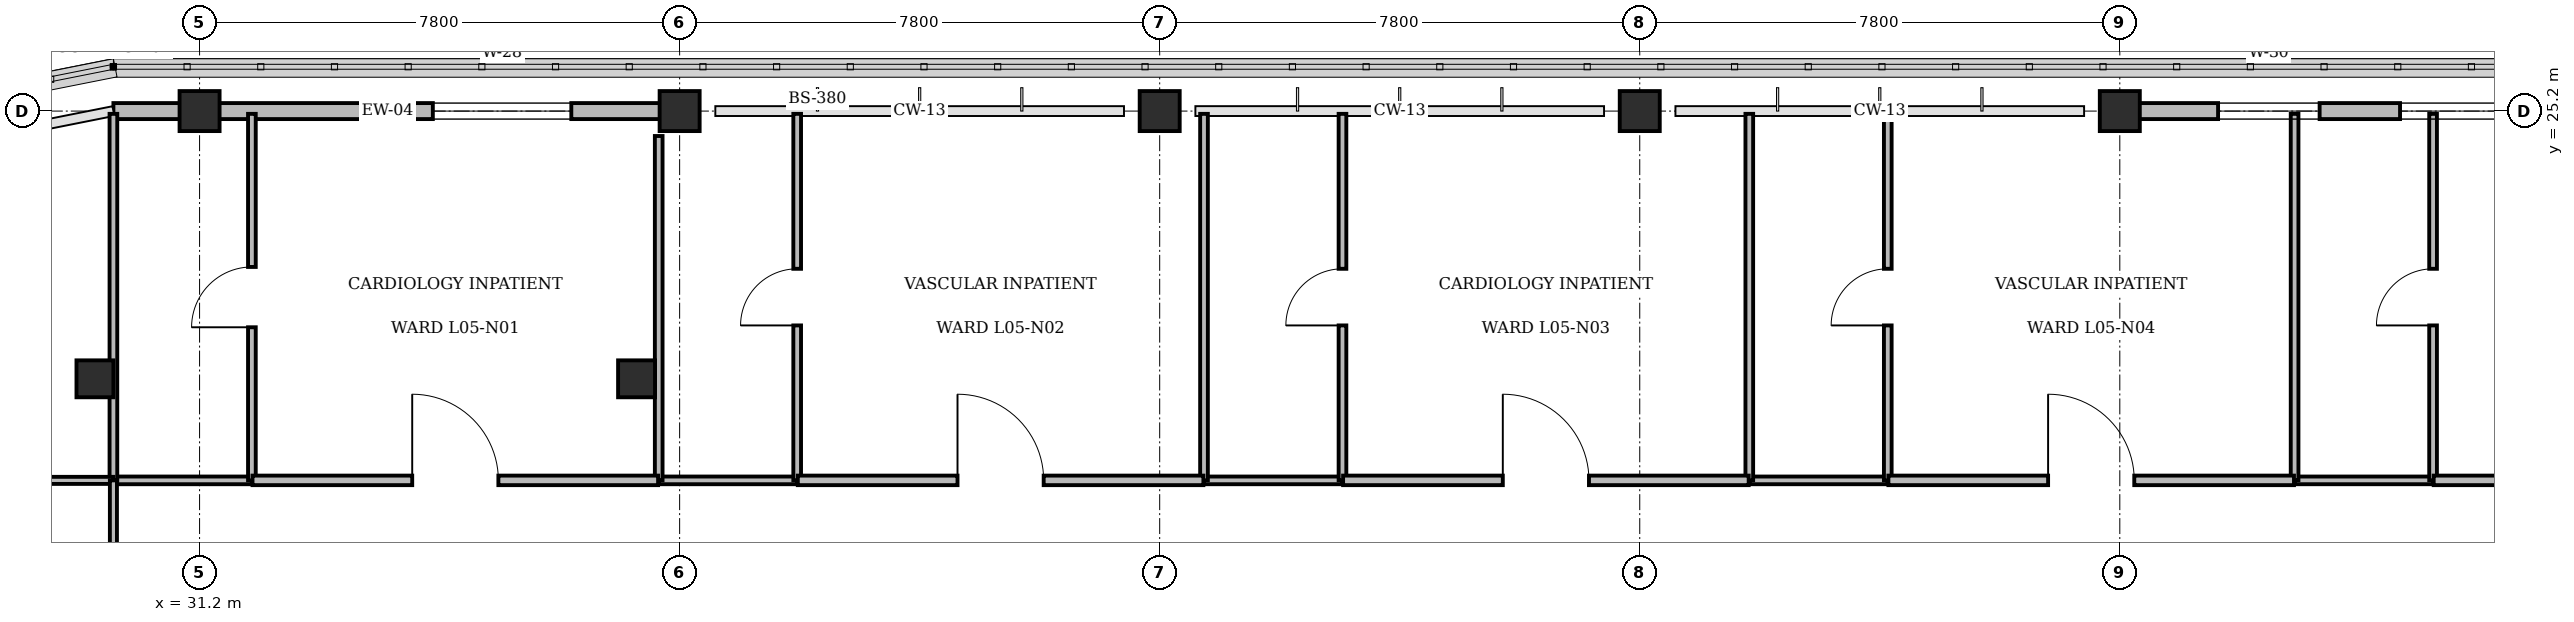
"""IFC4 building model, lengths in metres.
Left out: names, types, materials, properties, quantities, classifications, styles, units other than length and angle.
Written with IfcOpenShell. Run it as: python <this file> out.ifc"""

import sys

from ifc_helpers import new_model, si_unit, direction, frame, frame_2d, origin, origin_2d, place, context, subcontext, project, spatial, rectangle, circle, extrude, element, fill, save


model = new_model("IFC4")
c1 = context("Model", 3, precision=1e-05, world=origin(), true_north=direction((0.0, 1.0)))
c2 = subcontext(c1, "Body", "Model", "MODEL_VIEW")
j1 = project(units=[si_unit("LENGTHUNIT", "METRE"), si_unit("PLANEANGLEUNIT", "RADIAN")], contexts=[c1])
p1 = place(None, origin())
s1 = spatial("IfcSite", under=j1, at=p1, CompositionType="ELEMENT")
p2 = place(p1, origin())
s2 = spatial("IfcBuilding", under=s1, at=p2, CompositionType="ELEMENT")
p3 = place(p2, frame((0.0, 0.0, 22.2)))
s3 = spatial("IfcBuildingStorey", under=s2, at=p3, CompositionType="ELEMENT", Elevation=22.2)
for number, where, z_axis, x_axis in (
    (1, (31.2, 25.2, 0.0), (0.0, 0.0, 1.0), (1.0, 0.0, 0.0)),
    (2, (39.0, 25.2, 0.0), (0.0, 0.0, 1.0), (1.0, 0.0, 0.0)),
    (3, (46.8, 25.2, 0.0), (0.0, 0.0, 1.0), (1.0, 0.0, 0.0)),
    (4, (54.6, 25.2, 0.0), (0.0, 0.0, 1.0), (1.0, 0.0, 0.0)),
    (5, (62.4, 25.2, 0.0), (0.0, 0.0, 1.0), (1.0, 0.0, 0.0)),
):
    element("IfcColumn", number, at=place(p3, frame(where, z_axis=z_axis, x_axis=x_axis)), inside=s3, PredefinedType="COLUMN", context=c2, shape_type="SweptSolid", body=[
        extrude(rectangle(XDim=0.65, YDim=0.65, at=origin_2d()), origin(), (0.0, 0.0, 1.0), 4.2),
    ])
for number, where, z_axis, x_axis in (
    (6, (29.5, 20.85, 0.0), (0.0, 0.0, 1.0), (1.0, 0.0, 0.0)),
    (7, (38.3, 20.85, 0.0), (0.0, 0.0, 1.0), (1.0, 0.0, 0.0)),
):
    element("IfcColumn", number, at=place(p3, frame(where, z_axis=z_axis, x_axis=x_axis)), inside=s3, PredefinedType="PILASTER", context=c2, shape_type="SweptSolid", body=[
        extrude(circle(Radius=0.3, at=origin_2d()), origin(), (0.0, 0.0, 1.0), 4.2),
    ])
p4 = place(p3, frame((29.8, 25.2, 0.0), z_axis=(0.0, 0.0, 1.0), x_axis=(1.0, 0.0, 0.0)))
e8 = element("IfcWall", 8, at=p4, inside=s3, PredefinedType="STANDARD", context=c2, shape_type="SweptSolid", body=[
    extrude(rectangle(XDim=8.91, YDim=0.26, at=frame_2d((4.455, 0.0))), origin(), (0.0, 0.0, 1.0), 3.305),
])
p5 = place(p4, frame((5.19, 0.0, 0.85)))
e9 = element("IfcOpeningElement", 9, at=p5, cuts=e8, PredefinedType="OPENING", context=c2, shape_type="SweptSolid", body=[
    extrude(rectangle(XDim=2.25, YDim=1.45, at=frame_2d((1.125, 0.725))), frame((0.0, 0.14, 0.0), z_axis=(0.0, -1.0, 0.0), x_axis=(1.0, 0.0, 0.0)), (0.0, 0.0, 1.0), 0.28),
])
p6 = place(p3, frame((62.69, 25.2, 0.0), z_axis=(0.0, 0.0, 1.0), x_axis=(1.0, 0.0, 0.0)))
e10 = element("IfcWall", 10, at=p6, inside=s3, PredefinedType="STANDARD", context=c2, shape_type="SweptSolid", body=[
    extrude(rectangle(XDim=7.22, YDim=0.26, at=frame_2d((3.61, 0.0))), origin(), (0.0, 0.0, 1.0), 3.305),
])
p7 = place(p6, frame((1.307, 0.0, 0.85)))
e11 = element("IfcOpeningElement", 11, at=p7, cuts=e10, PredefinedType="OPENING", context=c2, shape_type="SweptSolid", body=[
    extrude(rectangle(XDim=1.65, YDim=1.45, at=frame_2d((0.825, 0.725))), frame((0.0, 0.14, 0.0), z_axis=(0.0, -1.0, 0.0), x_axis=(1.0, 0.0, 0.0)), (0.0, 0.0, 1.0), 0.28),
])
p8 = place(p6, frame((4.263, 0.0, 0.85)))
e12 = element("IfcOpeningElement", 12, at=p8, cuts=e10, PredefinedType="OPENING", context=c2, shape_type="SweptSolid", body=[
    extrude(rectangle(XDim=1.65, YDim=1.45, at=frame_2d((0.825, 0.725))), frame((0.0, 0.14, 0.0), z_axis=(0.0, -1.0, 0.0), x_axis=(1.0, 0.0, 0.0)), (0.0, 0.0, 1.0), 0.28),
])
p9 = place(p3, frame((29.8, 19.2, 0.0), z_axis=(0.0, 0.0, 1.0), x_axis=(1.0, 0.0, 0.0)))
e13 = element("IfcWall", 13, at=p9, inside=s3, PredefinedType="PARTITIONING", context=c2, shape_type="SweptSolid", body=[
    extrude(rectangle(XDim=2.25, YDim=0.125, at=frame_2d((1.125, 0.0))), origin(), (0.0, 0.0, 1.0), 3.9),
])
p10 = place(p3, frame((29.8, 19.2, 0.0), z_axis=(0.0, 0.0, 1.0), x_axis=(0.0, 1.0, 0.0)))
e14 = element("IfcWall", 14, at=p10, inside=s3, PredefinedType="PARTITIONING", context=c2, shape_type="SweptSolid", body=[
    extrude(rectangle(XDim=5.955, YDim=0.125, at=frame_2d((2.978, 0.0))), origin(), (0.0, 0.0, 1.0), 3.9),
])
p11 = place(p3, frame((32.05, 19.2, 0.0), z_axis=(0.0, 0.0, 1.0), x_axis=(0.0, 1.0, 0.0)))
e15 = element("IfcWall", 15, at=p11, inside=s3, PredefinedType="PARTITIONING", context=c2, shape_type="SweptSolid", body=[
    extrude(rectangle(XDim=5.955, YDim=0.125, at=frame_2d((2.978, 0.0))), origin(), (0.0, 0.0, 1.0), 3.9),
])
p12 = place(p11, frame((2.488, 0.0, 0.0)))
e16 = element("IfcOpeningElement", 16, at=p12, cuts=e15, PredefinedType="OPENING", context=c2, shape_type="SweptSolid", body=[
    extrude(rectangle(XDim=0.98, YDim=2.1, at=frame_2d((0.49, 1.05))), frame((0.0, 0.073, 0.0), z_axis=(0.0, -1.0, 0.0), x_axis=(1.0, 0.0, 0.0)), (0.0, 0.0, 1.0), 0.145),
])
p13 = place(p3, frame((38.66, 19.2, 0.0), z_axis=(0.0, 0.0, 1.0), x_axis=(1.0, 0.0, 0.0)))
e17 = element("IfcWall", 17, at=p13, inside=s3, PredefinedType="PARTITIONING", context=c2, shape_type="SweptSolid", body=[
    extrude(rectangle(XDim=2.25, YDim=0.125, at=frame_2d((1.125, 0.0))), origin(), (0.0, 0.0, 1.0), 3.9),
])
p14 = place(p3, frame((38.66, 19.2, 0.0), z_axis=(0.0, 0.0, 1.0), x_axis=(0.0, 1.0, 0.0)))
e18 = element("IfcWall", 18, at=p14, inside=s3, PredefinedType="PARTITIONING", context=c2, shape_type="SweptSolid", body=[
    extrude(rectangle(XDim=5.595, YDim=0.125, at=frame_2d((2.797, 0.0))), origin(), (0.0, 0.0, 1.0), 3.27),
])
p15 = place(p3, frame((40.91, 19.2, 0.0), z_axis=(0.0, 0.0, 1.0), x_axis=(0.0, 1.0, 0.0)))
e19 = element("IfcWall", 19, at=p15, inside=s3, PredefinedType="PARTITIONING", context=c2, shape_type="SweptSolid", body=[
    extrude(rectangle(XDim=5.955, YDim=0.125, at=frame_2d((2.978, 0.0))), origin(), (0.0, 0.0, 1.0), 3.9),
])
p16 = place(p15, frame((2.518, 0.0, 0.0)))
e20 = element("IfcOpeningElement", 20, at=p16, cuts=e19, PredefinedType="OPENING", context=c2, shape_type="SweptSolid", body=[
    extrude(rectangle(XDim=0.92, YDim=2.1, at=frame_2d((0.46, 1.05))), frame((0.0, 0.073, 0.0), z_axis=(0.0, -1.0, 0.0), x_axis=(1.0, 0.0, 0.0)), (0.0, 0.0, 1.0), 0.145),
])
p17 = place(p3, frame((47.52, 19.2, 0.0), z_axis=(0.0, 0.0, 1.0), x_axis=(1.0, 0.0, 0.0)))
e21 = element("IfcWall", 21, at=p17, inside=s3, PredefinedType="PARTITIONING", context=c2, shape_type="SweptSolid", body=[
    extrude(rectangle(XDim=2.25, YDim=0.125, at=frame_2d((1.125, 0.0))), origin(), (0.0, 0.0, 1.0), 3.9),
])
p18 = place(p3, frame((47.52, 19.2, 0.0), z_axis=(0.0, 0.0, 1.0), x_axis=(0.0, 1.0, 0.0)))
e22 = element("IfcWall", 22, at=p18, inside=s3, PredefinedType="PARTITIONING", context=c2, shape_type="SweptSolid", body=[
    extrude(rectangle(XDim=5.955, YDim=0.125, at=frame_2d((2.978, 0.0))), origin(), (0.0, 0.0, 1.0), 3.9),
])
p19 = place(p3, frame((49.77, 19.2, 0.0), z_axis=(0.0, 0.0, 1.0), x_axis=(0.0, 1.0, 0.0)))
e23 = element("IfcWall", 23, at=p19, inside=s3, PredefinedType="PARTITIONING", context=c2, shape_type="SweptSolid", body=[
    extrude(rectangle(XDim=5.955, YDim=0.125, at=frame_2d((2.978, 0.0))), origin(), (0.0, 0.0, 1.0), 3.9),
])
p20 = place(p19, frame((2.518, 0.0, 0.0)))
e24 = element("IfcOpeningElement", 24, at=p20, cuts=e23, PredefinedType="OPENING", context=c2, shape_type="SweptSolid", body=[
    extrude(rectangle(XDim=0.92, YDim=2.1, at=frame_2d((0.46, 1.05))), frame((0.0, 0.073, 0.0), z_axis=(0.0, -1.0, 0.0), x_axis=(1.0, 0.0, 0.0)), (0.0, 0.0, 1.0), 0.145),
])
p21 = place(p3, frame((56.38, 19.2, 0.0), z_axis=(0.0, 0.0, 1.0), x_axis=(1.0, 0.0, 0.0)))
e25 = element("IfcWall", 25, at=p21, inside=s3, PredefinedType="PARTITIONING", context=c2, shape_type="SweptSolid", body=[
    extrude(rectangle(XDim=2.25, YDim=0.125, at=frame_2d((1.125, 0.0))), origin(), (0.0, 0.0, 1.0), 3.9),
])
p22 = place(p3, frame((56.38, 19.2, 0.0), z_axis=(0.0, 0.0, 1.0), x_axis=(0.0, 1.0, 0.0)))
e26 = element("IfcWall", 26, at=p22, inside=s3, PredefinedType="PARTITIONING", context=c2, shape_type="SweptSolid", body=[
    extrude(rectangle(XDim=5.955, YDim=0.125, at=frame_2d((2.978, 0.0))), origin(), (0.0, 0.0, 1.0), 3.9),
])
p23 = place(p3, frame((58.63, 19.2, 0.0), z_axis=(0.0, 0.0, 1.0), x_axis=(0.0, 1.0, 0.0)))
e27 = element("IfcWall", 27, at=p23, inside=s3, PredefinedType="PARTITIONING", context=c2, shape_type="SweptSolid", body=[
    extrude(rectangle(XDim=5.955, YDim=0.125, at=frame_2d((2.978, 0.0))), origin(), (0.0, 0.0, 1.0), 3.9),
])
p24 = place(p23, frame((2.518, 0.0, 0.0)))
e28 = element("IfcOpeningElement", 28, at=p24, cuts=e27, PredefinedType="OPENING", context=c2, shape_type="SweptSolid", body=[
    extrude(rectangle(XDim=0.92, YDim=2.1, at=frame_2d((0.46, 1.05))), frame((0.0, 0.073, 0.0), z_axis=(0.0, -1.0, 0.0), x_axis=(1.0, 0.0, 0.0)), (0.0, 0.0, 1.0), 0.145),
])
p25 = place(p3, frame((65.24, 19.2, 0.0), z_axis=(0.0, 0.0, 1.0), x_axis=(1.0, 0.0, 0.0)))
e29 = element("IfcWall", 29, at=p25, inside=s3, PredefinedType="PARTITIONING", context=c2, shape_type="SweptSolid", body=[
    extrude(rectangle(XDim=2.25, YDim=0.125, at=frame_2d((1.125, 0.0))), origin(), (0.0, 0.0, 1.0), 3.9),
])
p26 = place(p3, frame((65.24, 19.2, 0.0), z_axis=(0.0, 0.0, 1.0), x_axis=(0.0, 1.0, 0.0)))
e30 = element("IfcWall", 30, at=p26, inside=s3, PredefinedType="PARTITIONING", context=c2, shape_type="SweptSolid", body=[
    extrude(rectangle(XDim=5.955, YDim=0.125, at=frame_2d((2.978, 0.0))), origin(), (0.0, 0.0, 1.0), 3.9),
])
p27 = place(p3, frame((67.49, 19.2, 0.0), z_axis=(0.0, 0.0, 1.0), x_axis=(0.0, 1.0, 0.0)))
e31 = element("IfcWall", 31, at=p27, inside=s3, PredefinedType="PARTITIONING", context=c2, shape_type="SweptSolid", body=[
    extrude(rectangle(XDim=5.955, YDim=0.125, at=frame_2d((2.978, 0.0))), origin(), (0.0, 0.0, 1.0), 3.9),
])
p28 = place(p27, frame((2.518, 0.0, 0.0)))
e32 = element("IfcOpeningElement", 32, at=p28, cuts=e31, PredefinedType="OPENING", context=c2, shape_type="SweptSolid", body=[
    extrude(rectangle(XDim=0.92, YDim=2.1, at=frame_2d((0.46, 1.05))), frame((0.0, 0.073, 0.0), z_axis=(0.0, -1.0, 0.0), x_axis=(1.0, 0.0, 0.0)), (0.0, 0.0, 1.0), 0.145),
])
p29 = place(p3, frame((17.7, 19.2, 0.0), z_axis=(0.0, 0.0, 1.0), x_axis=(1.0, 0.0, 0.0)))
e33 = element("IfcWall", 33, at=p29, inside=s3, PredefinedType="PARTITIONING", context=c2, shape_type="SweptSolid", body=[
    extrude(rectangle(XDim=12.1, YDim=0.115, at=frame_2d((6.05, 0.0))), origin(), (0.0, 0.0, 1.0), 3.9),
])
p30 = place(p3, frame((29.8, 6.0, 0.0), z_axis=(0.0, 0.0, 1.0), x_axis=(0.0, 1.0, 0.0)))
e34 = element("IfcWall", 34, at=p30, inside=s3, PredefinedType="PARTITIONING", context=c2, shape_type="SweptSolid", body=[
    extrude(rectangle(XDim=13.2, YDim=0.115, at=frame_2d((6.6, 0.0))), origin(), (0.0, 0.0, 1.0), 3.9),
])
p31 = place(p30, frame((0.25, 0.0, 0.0)))
e35 = element("IfcOpeningElement", 35, at=p31, cuts=e34, PredefinedType="OPENING", context=c2, shape_type="SweptSolid", body=[
    extrude(rectangle(XDim=1.32, YDim=2.15, at=frame_2d((0.66, 1.075))), frame((0.0, 0.067, 0.0), z_axis=(0.0, -1.0, 0.0), x_axis=(1.0, 0.0, 0.0)), (0.0, 0.0, 1.0), 0.135),
])
p32 = place(p3, frame((32.06, 19.2, 0.0), z_axis=(0.0, 0.0, 1.0), x_axis=(1.0, 0.0, 0.0)))
e36 = element("IfcWall", 36, at=p32, inside=s3, PredefinedType="PARTITIONING", context=c2, shape_type="SweptSolid", body=[
    extrude(rectangle(XDim=6.59, YDim=0.155, at=frame_2d((3.295, 0.0))), origin(), (0.0, 0.0, 1.0), 3.9),
])
p33 = place(p32, frame((2.595, 0.0, 0.0)))
e37 = element("IfcOpeningElement", 37, at=p33, cuts=e36, PredefinedType="OPENING", context=c2, shape_type="SweptSolid", body=[
    extrude(rectangle(XDim=1.4, YDim=2.2, at=frame_2d((0.7, 1.1))), frame((0.0, 0.087, 0.0), z_axis=(0.0, -1.0, 0.0), x_axis=(1.0, 0.0, 0.0)), (0.0, 0.0, 1.0), 0.175),
])
p34 = place(p3, frame((40.92, 19.2, 0.0), z_axis=(0.0, 0.0, 1.0), x_axis=(1.0, 0.0, 0.0)))
e38 = element("IfcWall", 38, at=p34, inside=s3, PredefinedType="PARTITIONING", context=c2, shape_type="SweptSolid", body=[
    extrude(rectangle(XDim=6.59, YDim=0.155, at=frame_2d((3.295, 0.0))), origin(), (0.0, 0.0, 1.0), 3.9),
])
p35 = place(p34, frame((2.595, 0.0, 0.0)))
e39 = element("IfcOpeningElement", 39, at=p35, cuts=e38, PredefinedType="OPENING", context=c2, shape_type="SweptSolid", body=[
    extrude(rectangle(XDim=1.4, YDim=2.2, at=frame_2d((0.7, 1.1))), frame((0.0, 0.087, 0.0), z_axis=(0.0, -1.0, 0.0), x_axis=(1.0, 0.0, 0.0)), (0.0, 0.0, 1.0), 0.175),
])
p36 = place(p3, frame((49.78, 19.2, 0.0), z_axis=(0.0, 0.0, 1.0), x_axis=(1.0, 0.0, 0.0)))
e40 = element("IfcWall", 40, at=p36, inside=s3, PredefinedType="PARTITIONING", context=c2, shape_type="SweptSolid", body=[
    extrude(rectangle(XDim=6.59, YDim=0.155, at=frame_2d((3.295, 0.0))), origin(), (0.0, 0.0, 1.0), 3.9),
])
p37 = place(p36, frame((2.595, 0.0, 0.0)))
e41 = element("IfcOpeningElement", 41, at=p37, cuts=e40, PredefinedType="OPENING", context=c2, shape_type="SweptSolid", body=[
    extrude(rectangle(XDim=1.4, YDim=2.2, at=frame_2d((0.7, 1.1))), frame((0.0, 0.087, 0.0), z_axis=(0.0, -1.0, 0.0), x_axis=(1.0, 0.0, 0.0)), (0.0, 0.0, 1.0), 0.175),
])
p38 = place(p3, frame((58.64, 19.2, 0.0), z_axis=(0.0, 0.0, 1.0), x_axis=(1.0, 0.0, 0.0)))
e42 = element("IfcWall", 42, at=p38, inside=s3, PredefinedType="PARTITIONING", context=c2, shape_type="SweptSolid", body=[
    extrude(rectangle(XDim=6.59, YDim=0.155, at=frame_2d((3.295, 0.0))), origin(), (0.0, 0.0, 1.0), 3.9),
])
p39 = place(p38, frame((2.595, 0.0, 0.0)))
e43 = element("IfcOpeningElement", 43, at=p39, cuts=e42, PredefinedType="OPENING", context=c2, shape_type="SweptSolid", body=[
    extrude(rectangle(XDim=1.4, YDim=2.2, at=frame_2d((0.7, 1.1))), frame((0.0, 0.087, 0.0), z_axis=(0.0, -1.0, 0.0), x_axis=(1.0, 0.0, 0.0)), (0.0, 0.0, 1.0), 0.175),
])
p40 = place(p3, frame((67.5, 19.2, 0.0), z_axis=(0.0, 0.0, 1.0), x_axis=(1.0, 0.0, 0.0)))
e44 = element("IfcWall", 44, at=p40, inside=s3, PredefinedType="PARTITIONING", context=c2, shape_type="SweptSolid", body=[
    extrude(rectangle(XDim=6.59, YDim=0.155, at=frame_2d((3.295, 0.0))), origin(), (0.0, 0.0, 1.0), 3.9),
])
p41 = place(p40, frame((2.595, 0.0, 0.0)))
e45 = element("IfcOpeningElement", 45, at=p41, cuts=e44, PredefinedType="OPENING", context=c2, shape_type="SweptSolid", body=[
    extrude(rectangle(XDim=1.4, YDim=2.2, at=frame_2d((0.7, 1.1))), frame((0.0, 0.087, 0.0), z_axis=(0.0, -1.0, 0.0), x_axis=(1.0, 0.0, 0.0)), (0.0, 0.0, 1.0), 0.175),
])
p42 = place(p5, origin())
e46 = element("IfcWindow", 46, at=p42, inside=s3, PartitioningType="SINGLE_PANEL", PredefinedType="WINDOW", context=c2, shape_type="SweptSolid", body=[
    extrude(rectangle(XDim=2.25, YDim=1.45, at=frame_2d((1.125, 0.725))), frame((0.0, 0.03, 0.0), z_axis=(0.0, -1.0, 0.0), x_axis=(1.0, 0.0, 0.0)), (0.0, 0.0, 1.0), 0.06),
])
fill(e9, e46)
p43 = place(p7, origin())
e47 = element("IfcWindow", 47, at=p43, inside=s3, PartitioningType="SINGLE_PANEL", PredefinedType="WINDOW", context=c2, shape_type="SweptSolid", body=[
    extrude(rectangle(XDim=1.65, YDim=1.45, at=frame_2d((0.825, 0.725))), frame((0.0, 0.03, 0.0), z_axis=(0.0, -1.0, 0.0), x_axis=(1.0, 0.0, 0.0)), (0.0, 0.0, 1.0), 0.06),
])
fill(e11, e47)
p44 = place(p8, origin())
e48 = element("IfcWindow", 48, at=p44, inside=s3, PartitioningType="SINGLE_PANEL", PredefinedType="WINDOW", context=c2, shape_type="SweptSolid", body=[
    extrude(rectangle(XDim=1.65, YDim=1.45, at=frame_2d((0.825, 0.725))), frame((0.0, 0.03, 0.0), z_axis=(0.0, -1.0, 0.0), x_axis=(1.0, 0.0, 0.0)), (0.0, 0.0, 1.0), 0.06),
])
fill(e12, e48)
p45 = place(p12, origin())
e49 = element("IfcDoor", 49, at=p45, inside=s3, OperationType="SINGLE_SWING_LEFT", PredefinedType="DOOR", context=c2, shape_type="SweptSolid", body=[
    extrude(rectangle(XDim=0.98, YDim=2.1, at=frame_2d((0.49, 1.05))), frame((0.0, 0.025, 0.0), z_axis=(0.0, -1.0, 0.0), x_axis=(1.0, 0.0, 0.0)), (0.0, 0.0, 1.0), 0.05),
])
fill(e16, e49)
p46 = place(p16, origin())
e50 = element("IfcDoor", 50, at=p46, inside=s3, OperationType="SINGLE_SWING_LEFT", PredefinedType="DOOR", context=c2, shape_type="SweptSolid", body=[
    extrude(rectangle(XDim=0.92, YDim=2.1, at=frame_2d((0.46, 1.05))), frame((0.0, 0.025, 0.0), z_axis=(0.0, -1.0, 0.0), x_axis=(1.0, 0.0, 0.0)), (0.0, 0.0, 1.0), 0.05),
])
fill(e20, e50)
p47 = place(p20, origin())
e51 = element("IfcDoor", 51, at=p47, inside=s3, OperationType="SINGLE_SWING_LEFT", PredefinedType="DOOR", context=c2, shape_type="SweptSolid", body=[
    extrude(rectangle(XDim=0.92, YDim=2.1, at=frame_2d((0.46, 1.05))), frame((0.0, 0.025, 0.0), z_axis=(0.0, -1.0, 0.0), x_axis=(1.0, 0.0, 0.0)), (0.0, 0.0, 1.0), 0.05),
])
fill(e24, e51)
p48 = place(p24, origin())
e52 = element("IfcDoor", 52, at=p48, inside=s3, OperationType="SINGLE_SWING_LEFT", PredefinedType="DOOR", context=c2, shape_type="SweptSolid", body=[
    extrude(rectangle(XDim=0.92, YDim=2.1, at=frame_2d((0.46, 1.05))), frame((0.0, 0.025, 0.0), z_axis=(0.0, -1.0, 0.0), x_axis=(1.0, 0.0, 0.0)), (0.0, 0.0, 1.0), 0.05),
])
fill(e28, e52)
p49 = place(p28, origin())
e53 = element("IfcDoor", 53, at=p49, inside=s3, OperationType="SINGLE_SWING_LEFT", PredefinedType="DOOR", context=c2, shape_type="SweptSolid", body=[
    extrude(rectangle(XDim=0.92, YDim=2.1, at=frame_2d((0.46, 1.05))), frame((0.0, 0.025, 0.0), z_axis=(0.0, -1.0, 0.0), x_axis=(1.0, 0.0, 0.0)), (0.0, 0.0, 1.0), 0.05),
])
fill(e32, e53)
p50 = place(p33, origin())
e54 = element("IfcDoor", 54, at=p50, inside=s3, OperationType="SINGLE_SWING_LEFT", PredefinedType="DOOR", context=c2, shape_type="SweptSolid", body=[
    extrude(rectangle(XDim=1.4, YDim=2.2, at=frame_2d((0.7, 1.1))), frame((0.0, 0.025, 0.0), z_axis=(0.0, -1.0, 0.0), x_axis=(1.0, 0.0, 0.0)), (0.0, 0.0, 1.0), 0.05),
])
fill(e37, e54)
p51 = place(p35, origin())
e55 = element("IfcDoor", 55, at=p51, inside=s3, OperationType="SINGLE_SWING_LEFT", PredefinedType="DOOR", context=c2, shape_type="SweptSolid", body=[
    extrude(rectangle(XDim=1.4, YDim=2.2, at=frame_2d((0.7, 1.1))), frame((0.0, 0.025, 0.0), z_axis=(0.0, -1.0, 0.0), x_axis=(1.0, 0.0, 0.0)), (0.0, 0.0, 1.0), 0.05),
])
fill(e39, e55)
p52 = place(p37, origin())
e56 = element("IfcDoor", 56, at=p52, inside=s3, OperationType="SINGLE_SWING_LEFT", PredefinedType="DOOR", context=c2, shape_type="SweptSolid", body=[
    extrude(rectangle(XDim=1.4, YDim=2.2, at=frame_2d((0.7, 1.1))), frame((0.0, 0.025, 0.0), z_axis=(0.0, -1.0, 0.0), x_axis=(1.0, 0.0, 0.0)), (0.0, 0.0, 1.0), 0.05),
])
fill(e41, e56)
p53 = place(p39, origin())
e57 = element("IfcDoor", 57, at=p53, inside=s3, OperationType="SINGLE_SWING_LEFT", PredefinedType="DOOR", context=c2, shape_type="SweptSolid", body=[
    extrude(rectangle(XDim=1.4, YDim=2.2, at=frame_2d((0.7, 1.1))), frame((0.0, 0.025, 0.0), z_axis=(0.0, -1.0, 0.0), x_axis=(1.0, 0.0, 0.0)), (0.0, 0.0, 1.0), 0.05),
])
fill(e43, e57)
save(model, sys.argv[1])
